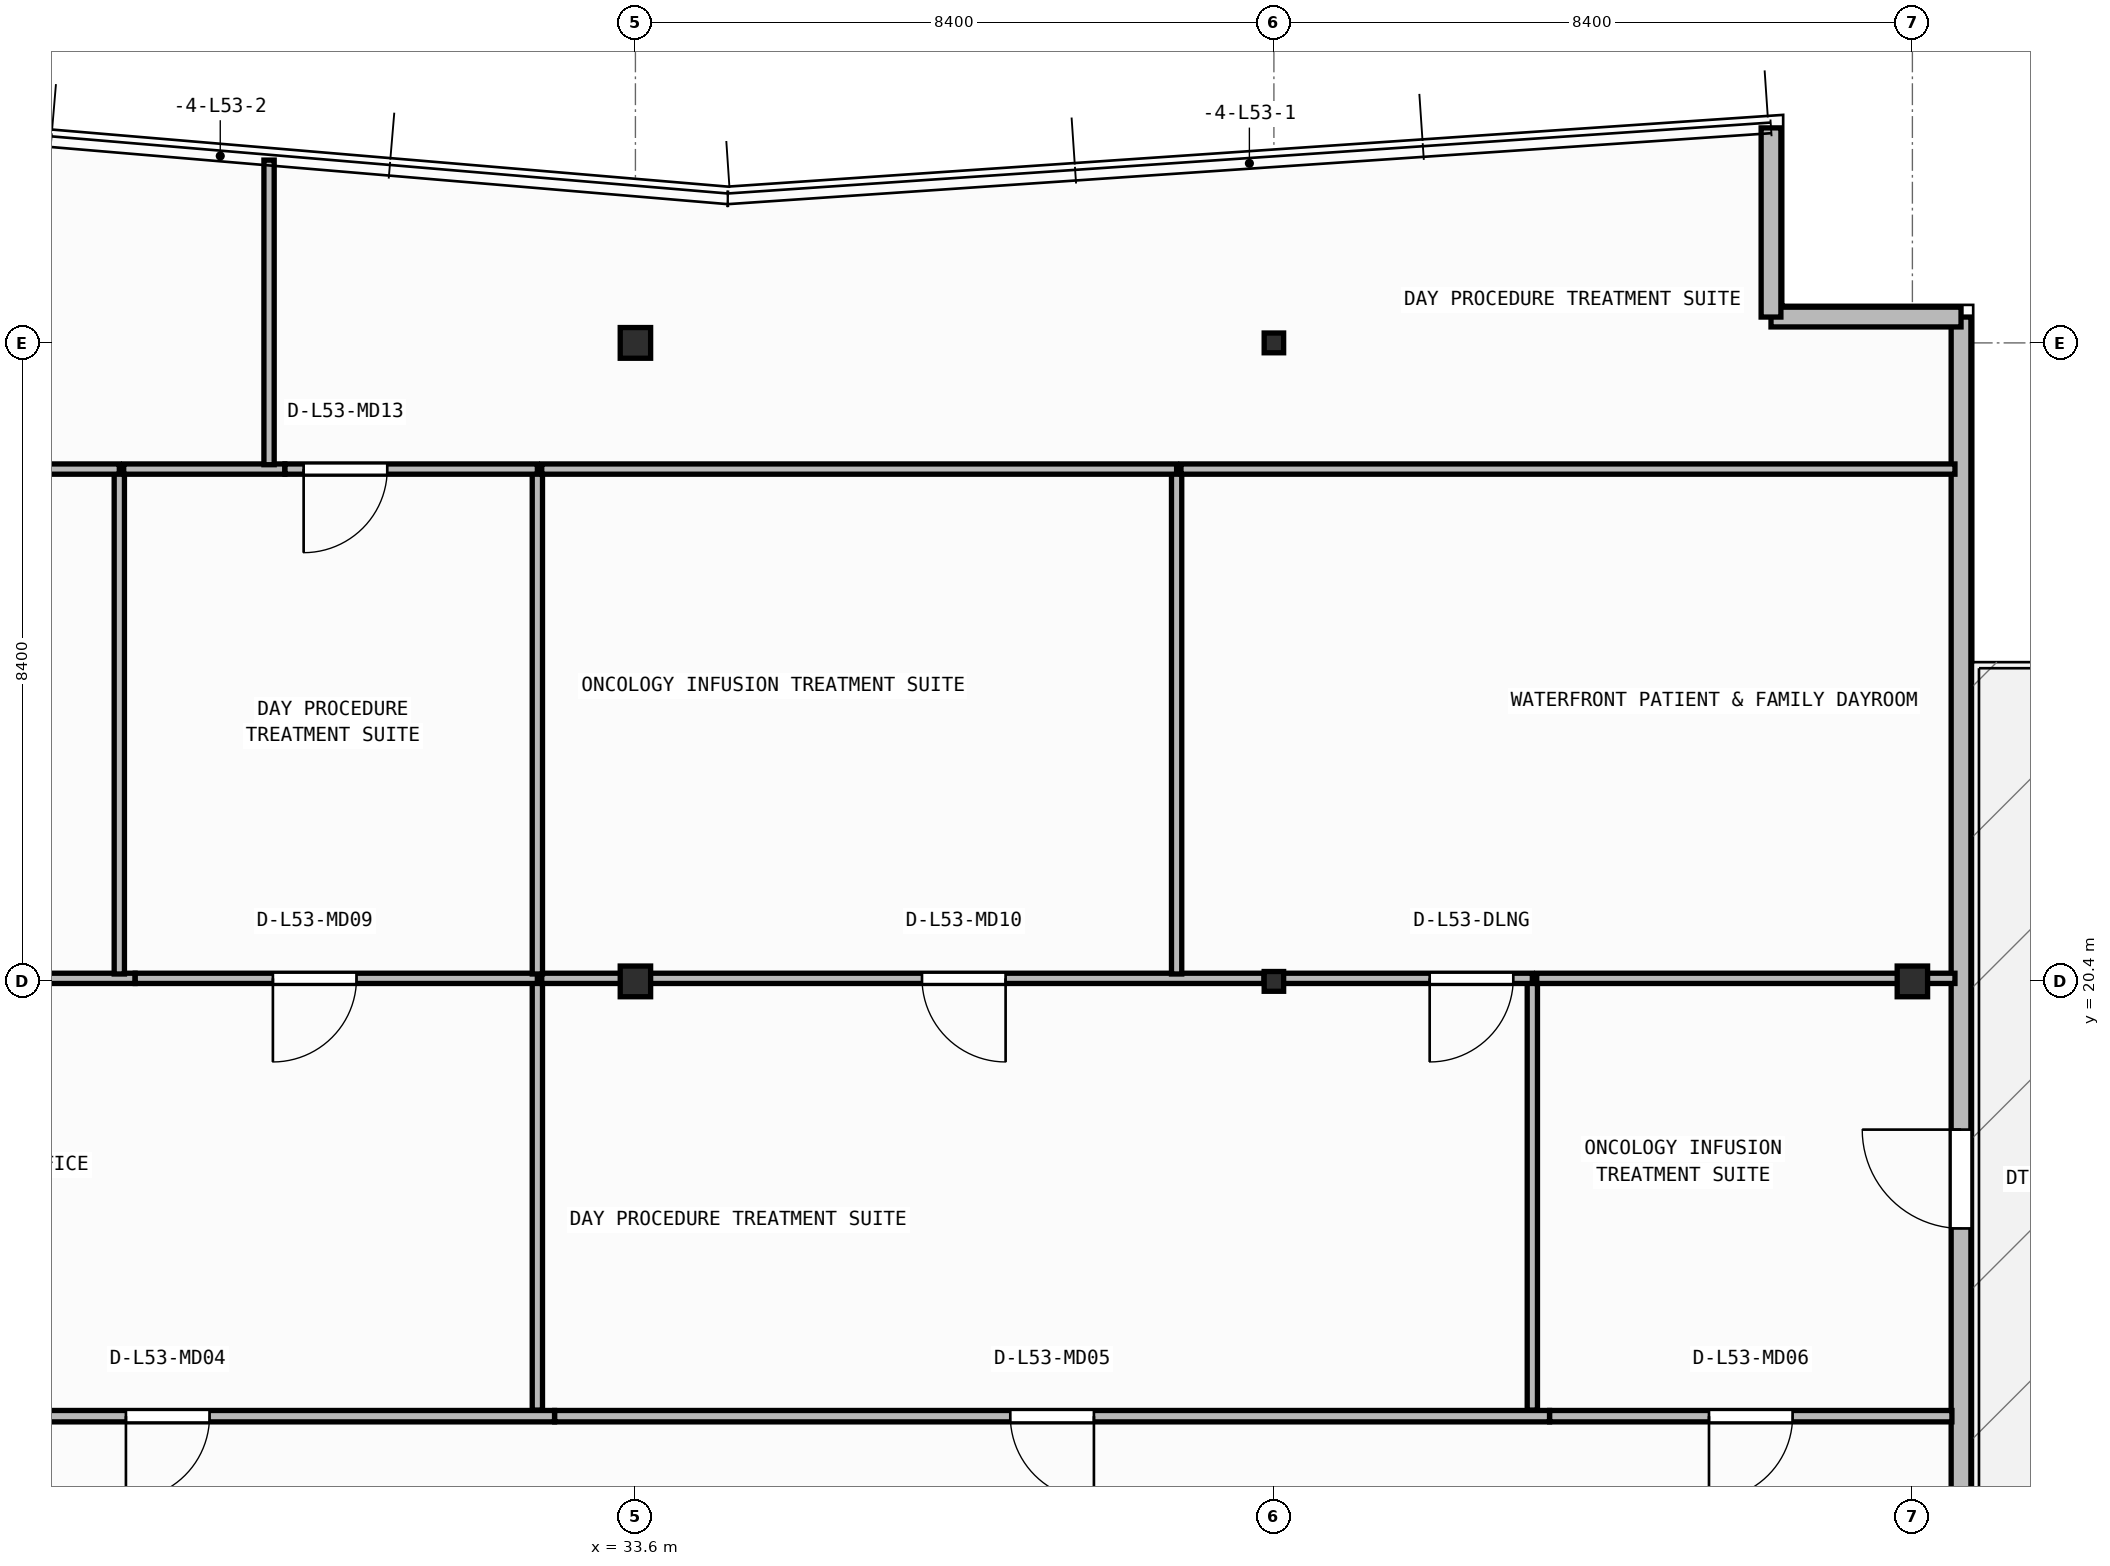
"""IFC4 building model, lengths in metres.
Left out: names, types, materials, properties, quantities, classifications, styles, units other than length and angle.
Written with IfcOpenShell. Run it as: python <this file> out.ifc"""

import sys

from ifc_helpers import new_model, si_unit, direction, frame, frame_2d, origin, origin_2d, place, context, subcontext, project, spatial, rectangle, i_section, extrude, element, fill, save


model = new_model("IFC4")
c1 = context("Model", 3, precision=1e-05, world=origin(), true_north=direction((0.0, 1.0)))
c2 = subcontext(c1, "Body", "Model", "MODEL_VIEW")
j1 = project(units=[si_unit("LENGTHUNIT", "METRE"), si_unit("PLANEANGLEUNIT", "RADIAN")], contexts=[c1])
p1 = place(None, origin())
s1 = spatial("IfcSite", under=j1, at=p1, CompositionType="ELEMENT")
p2 = place(p1, origin())
s2 = spatial("IfcBuilding", under=s1, at=p2, CompositionType="ELEMENT")
p3 = place(p2, frame((0.0, 0.0, 215.8)))
s3 = spatial("IfcBuildingStorey", under=s2, at=p3, CompositionType="ELEMENT", Elevation=215.8)
p4 = place(p3, frame((33.6, 20.4, 0.0), z_axis=(0.0, 0.0, 1.0), x_axis=(1.0, 0.0, 0.0)))
e1 = element("IfcColumn", 1, at=p4, inside=s3, PredefinedType="COLUMN", context=c2, shape_type="SweptSolid", body=[
    extrude(i_section(OverallWidth=0.4, OverallDepth=0.404, WebThickness=0.02, FlangeThickness=0.032, at=origin_2d()), origin(), (0.0, 0.0, 1.0), 3.95),
])
p5 = place(p3, frame((42.0, 20.4, 0.0), z_axis=(0.0, 0.0, 1.0), x_axis=(1.0, 0.0, 0.0)))
e2 = element("IfcColumn", 2, at=p5, inside=s3, PredefinedType="COLUMN", context=c2, shape_type="SweptSolid", body=[
    extrude(i_section(OverallWidth=0.256, OverallDepth=0.26, WebThickness=0.01, FlangeThickness=0.017, FilletRadius=0.013, at=origin_2d()), origin(), (0.0, 0.0, 1.0), 3.95),
])
for number, where, z_axis, x_axis in (
    (3, (50.4, 20.4, 0.0), (0.0, 0.0, 1.0), (1.0, 0.0, 0.0)),
    (4, (33.6, 28.8, 0.0), (0.0, 0.0, 1.0), (1.0, 0.0, 0.0)),
):
    element("IfcColumn", number, at=place(p3, frame(where, z_axis=z_axis, x_axis=x_axis)), inside=s3, PredefinedType="COLUMN", context=c2, shape_type="SweptSolid", body=[
        extrude(i_section(OverallWidth=0.4, OverallDepth=0.404, WebThickness=0.02, FlangeThickness=0.032, at=origin_2d()), origin(), (0.0, 0.0, 1.0), 3.95),
    ])
p6 = place(p3, frame((42.0, 28.8, 0.0), z_axis=(0.0, 0.0, 1.0), x_axis=(1.0, 0.0, 0.0)))
e5 = element("IfcColumn", 5, at=p6, inside=s3, PredefinedType="COLUMN", context=c2, shape_type="SweptSolid", body=[
    extrude(i_section(OverallWidth=0.256, OverallDepth=0.26, WebThickness=0.01, FlangeThickness=0.017, FilletRadius=0.013, at=origin_2d()), origin(), (0.0, 0.0, 1.0), 3.95),
])
p7 = place(p3, frame((51.04, 6.46, 0.0), z_axis=(0.0, 0.0, 1.0), x_axis=(0.0, 1.0, 0.0)))
e6 = element("IfcWall", 6, at=p7, inside=s3, PredefinedType="STANDARD", context=c2, shape_type="SweptSolid", body=[
    extrude(rectangle(XDim=22.68, YDim=0.26, at=frame_2d((11.34, 0.0))), origin(), (0.0, 0.0, 1.0), 3.71),
])
p8 = place(p7, frame((10.69, 0.0, 0.0)))
e7 = element("IfcOpeningElement", 7, at=p8, cuts=e6, PredefinedType="OPENING", context=c2, shape_type="SweptSolid", body=[
    extrude(rectangle(XDim=1.3, YDim=2.15, at=frame_2d((0.65, 1.075))), frame((0.0, 0.14, 0.0), z_axis=(0.0, -1.0, 0.0), x_axis=(1.0, 0.0, 0.0)), (0.0, 0.0, 1.0), 0.28),
])
p9 = place(p3, frame((51.04, 29.14, 0.0), z_axis=(0.0, 0.0, 1.0), x_axis=(-1.0, 0.0, 0.0)))
e8 = element("IfcWall", 8, at=p9, inside=s3, PredefinedType="STANDARD", context=c2, shape_type="SweptSolid", body=[
    extrude(rectangle(XDim=2.5, YDim=0.26, at=frame_2d((1.25, 0.0))), origin(), (0.0, 0.0, 1.0), 3.71),
])
p10 = place(p3, frame((48.54, 29.14, 0.0), z_axis=(0.0, 0.0, 1.0), x_axis=(0.0, 1.0, 0.0)))
e9 = element("IfcWall", 9, at=p10, inside=s3, PredefinedType="STANDARD", context=c2, shape_type="SweptSolid", body=[
    extrude(rectangle(XDim=2.489, YDim=0.26, at=frame_2d((1.245, 0.0))), origin(), (0.0, 0.0, 1.0), 3.71),
])
p11 = place(p3, frame((32.536, 14.68, 0.0), z_axis=(0.0, 0.0, 1.0), x_axis=(-1.0, 0.0, 0.0)))
e10 = element("IfcWall", 10, at=p11, inside=s3, PredefinedType="PARTITIONING", context=c2, shape_type="SweptSolid", body=[
    extrude(rectangle(XDim=10.178, YDim=0.15, at=frame_2d((5.089, 0.0))), origin(), (0.0, 0.0, 1.0), 3.71),
])
p12 = place(p11, frame((4.539, 0.0, 0.0)))
e11 = element("IfcOpeningElement", 11, at=p12, cuts=e10, PredefinedType="OPENING", context=c2, shape_type="SweptSolid", body=[
    extrude(rectangle(XDim=1.1, YDim=2.1, at=frame_2d((0.55, 1.05))), frame((0.0, 0.085, 0.0), z_axis=(0.0, -1.0, 0.0), x_axis=(1.0, 0.0, 0.0)), (0.0, 0.0, 1.0), 0.17),
])
p13 = place(p3, frame((45.626, 14.68, 0.0), z_axis=(0.0, 0.0, 1.0), x_axis=(-1.0, 0.0, 0.0)))
e12 = element("IfcWall", 12, at=p13, inside=s3, PredefinedType="PARTITIONING", context=c2, shape_type="SweptSolid", body=[
    extrude(rectangle(XDim=13.088, YDim=0.15, at=frame_2d((6.544, 0.0))), origin(), (0.0, 0.0, 1.0), 3.71),
])
p14 = place(p13, frame((5.994, 0.0, 0.0)))
e13 = element("IfcOpeningElement", 13, at=p14, cuts=e12, PredefinedType="OPENING", context=c2, shape_type="SweptSolid", body=[
    extrude(rectangle(XDim=1.1, YDim=2.1, at=frame_2d((0.55, 1.05))), frame((0.0, 0.085, 0.0), z_axis=(0.0, -1.0, 0.0), x_axis=(1.0, 0.0, 0.0)), (0.0, 0.0, 1.0), 0.17),
])
p15 = place(p3, frame((50.92, 14.68, 0.0), z_axis=(0.0, 0.0, 1.0), x_axis=(-1.0, 0.0, 0.0)))
e14 = element("IfcWall", 14, at=p15, inside=s3, PredefinedType="PARTITIONING", context=c2, shape_type="SweptSolid", body=[
    extrude(rectangle(XDim=5.292, YDim=0.15, at=frame_2d((2.646, 0.0))), origin(), (0.0, 0.0, 1.0), 3.71),
])
p16 = place(p15, frame((2.096, 0.0, 0.0)))
e15 = element("IfcOpeningElement", 15, at=p16, cuts=e14, PredefinedType="OPENING", context=c2, shape_type="SweptSolid", body=[
    extrude(rectangle(XDim=1.1, YDim=2.1, at=frame_2d((0.55, 1.05))), frame((0.0, 0.085, 0.0), z_axis=(0.0, -1.0, 0.0), x_axis=(1.0, 0.0, 0.0)), (0.0, 0.0, 1.0), 0.17),
])
p17 = place(p3, frame((32.31, 14.76, 0.0), z_axis=(0.0, 0.0, 1.0), x_axis=(0.0, 1.0, 0.0)))
e16 = element("IfcWall", 16, at=p17, inside=s3, PredefinedType="PARTITIONING", context=c2, shape_type="SweptSolid", body=[
    extrude(rectangle(XDim=5.68, YDim=0.135, at=frame_2d((2.84, 0.0))), origin(), (0.0, 0.0, 1.0), 3.71),
])
p18 = place(p3, frame((27.018, 20.44, 0.0), z_axis=(0.0, 0.0, 1.0), x_axis=(-1.0, 0.0, 0.0)))
e17 = element("IfcWall", 17, at=p18, inside=s3, PredefinedType="PARTITIONING", context=c2, shape_type="SweptSolid", body=[
    extrude(rectangle(XDim=4.83, YDim=0.135, at=frame_2d((2.415, 0.0))), origin(), (0.0, 0.0, 1.0), 3.152),
])
p19 = place(p3, frame((32.31, 20.44, 0.0), z_axis=(0.0, 0.0, 1.0), x_axis=(-1.0, 0.0, 0.0)))
e18 = element("IfcWall", 18, at=p19, inside=s3, PredefinedType="PARTITIONING", context=c2, shape_type="SweptSolid", body=[
    extrude(rectangle(XDim=5.291, YDim=0.135, at=frame_2d((2.645, 0.0))), origin(), (0.0, 0.0, 1.0), 3.152),
])
p20 = place(p19, frame((2.379, 0.0, 0.0)))
e19 = element("IfcOpeningElement", 19, at=p20, cuts=e18, PredefinedType="OPENING", context=c2, shape_type="SweptSolid", body=[
    extrude(rectangle(XDim=1.1, YDim=2.1, at=frame_2d((0.55, 1.05))), frame((0.0, 0.077, 0.0), z_axis=(0.0, -1.0, 0.0), x_axis=(1.0, 0.0, 0.0)), (0.0, 0.0, 1.0), 0.155),
])
p21 = place(p3, frame((45.4, 14.76, 0.0), z_axis=(0.0, 0.0, 1.0), x_axis=(0.0, 1.0, 0.0)))
e20 = element("IfcWall", 20, at=p21, inside=s3, PredefinedType="PARTITIONING", context=c2, shape_type="SweptSolid", body=[
    extrude(rectangle(XDim=5.68, YDim=0.135, at=frame_2d((2.84, 0.0))), origin(), (0.0, 0.0, 1.0), 3.71),
])
p22 = place(p3, frame((41.872, 20.44, 0.0), z_axis=(0.0, 0.0, 1.0), x_axis=(-1.0, 0.0, 0.0)))
e21 = element("IfcWall", 21, at=p22, inside=s3, PredefinedType="PARTITIONING", context=c2, shape_type="SweptSolid", body=[
    extrude(rectangle(XDim=9.505, YDim=0.135, at=frame_2d((4.752, 0.0))), origin(), (0.0, 0.0, 1.0), 3.152),
])
p23 = place(p22, frame((3.402, 0.0, 0.0)))
e22 = element("IfcOpeningElement", 22, at=p23, cuts=e21, PredefinedType="OPENING", context=c2, shape_type="SweptSolid", body=[
    extrude(rectangle(XDim=1.1, YDim=2.1, at=frame_2d((0.55, 1.05))), frame((0.0, 0.077, 0.0), z_axis=(0.0, -1.0, 0.0), x_axis=(1.0, 0.0, 0.0)), (0.0, 0.0, 1.0), 0.155),
])
p24 = place(p3, frame((45.4, 20.44, 0.0), z_axis=(0.0, 0.0, 1.0), x_axis=(-1.0, 0.0, 0.0)))
e23 = element("IfcWall", 23, at=p24, inside=s3, PredefinedType="PARTITIONING", context=c2, shape_type="SweptSolid", body=[
    extrude(rectangle(XDim=3.526, YDim=0.135, at=frame_2d((1.763, 0.0))), origin(), (0.0, 0.0, 1.0), 3.152),
])
p25 = place(p24, frame((0.25, 0.0, 0.0)))
e24 = element("IfcOpeningElement", 24, at=p25, cuts=e23, PredefinedType="OPENING", context=c2, shape_type="SweptSolid", body=[
    extrude(rectangle(XDim=1.1, YDim=2.1, at=frame_2d((0.55, 1.05))), frame((0.0, 0.077, 0.0), z_axis=(0.0, -1.0, 0.0), x_axis=(1.0, 0.0, 0.0)), (0.0, 0.0, 1.0), 0.155),
])
p26 = place(p3, frame((50.96, 20.44, 0.0), z_axis=(0.0, 0.0, 1.0), x_axis=(-1.0, 0.0, 0.0)))
e25 = element("IfcWall", 25, at=p26, inside=s3, PredefinedType="PARTITIONING", context=c2, shape_type="SweptSolid", body=[
    extrude(rectangle(XDim=5.502, YDim=0.135, at=frame_2d((2.751, 0.0))), origin(), (0.0, 0.0, 1.0), 3.152),
])
p27 = place(p3, frame((26.81, 20.498, 0.0), z_axis=(0.0, 0.0, 1.0), x_axis=(0.0, 1.0, 0.0)))
e26 = element("IfcWall", 26, at=p27, inside=s3, PredefinedType="PARTITIONING", context=c2, shape_type="SweptSolid", body=[
    extrude(rectangle(XDim=6.642, YDim=0.135, at=frame_2d((3.321, 0.0))), origin(), (0.0, 0.0, 1.0), 3.71),
])
p28 = place(p3, frame((26.81, 27.14, 0.0), z_axis=(0.0, 0.0, 1.0), x_axis=(-1.0, 0.0, 0.0)))
e27 = element("IfcWall", 27, at=p28, inside=s3, PredefinedType="PARTITIONING", context=c2, shape_type="SweptSolid", body=[
    extrude(rectangle(XDim=13.03, YDim=0.135, at=frame_2d((6.515, 0.0))), origin(), (0.0, 0.0, 1.0), 3.71),
])
p29 = place(p28, frame((5.1, 0.0, 0.0)))
e28 = element("IfcOpeningElement", 28, at=p29, cuts=e27, PredefinedType="OPENING", context=c2, shape_type="SweptSolid", body=[
    extrude(rectangle(XDim=1.1, YDim=2.1, at=frame_2d((0.55, 1.05))), frame((0.0, 0.077, 0.0), z_axis=(0.0, -1.0, 0.0), x_axis=(1.0, 0.0, 0.0)), (0.0, 0.0, 1.0), 0.155),
])
p30 = place(p3, frame((32.31, 20.498, 0.0), z_axis=(0.0, 0.0, 1.0), x_axis=(0.0, 1.0, 0.0)))
e29 = element("IfcWall", 29, at=p30, inside=s3, PredefinedType="PARTITIONING", context=c2, shape_type="SweptSolid", body=[
    extrude(rectangle(XDim=6.642, YDim=0.135, at=frame_2d((3.321, 0.0))), origin(), (0.0, 0.0, 1.0), 3.71),
])
p31 = place(p3, frame((28.988, 27.14, 0.0), z_axis=(0.0, 0.0, 1.0), x_axis=(-1.0, 0.0, 0.0)))
e30 = element("IfcWall", 30, at=p31, inside=s3, PredefinedType="PARTITIONING", context=c2, shape_type="SweptSolid", body=[
    extrude(rectangle(XDim=2.12, YDim=0.135, at=frame_2d((1.06, 0.0))), origin(), (0.0, 0.0, 1.0), 3.71),
])
p32 = place(p3, frame((32.31, 27.14, 0.0), z_axis=(0.0, 0.0, 1.0), x_axis=(-1.0, 0.0, 0.0)))
e31 = element("IfcWall", 31, at=p32, inside=s3, PredefinedType="PARTITIONING", context=c2, shape_type="SweptSolid", body=[
    extrude(rectangle(XDim=3.321, YDim=0.135, at=frame_2d((1.66, 0.0))), origin(), (0.0, 0.0, 1.0), 3.71),
])
p33 = place(p32, frame((1.975, 0.0, 0.0)))
e32 = element("IfcOpeningElement", 32, at=p33, cuts=e31, PredefinedType="OPENING", context=c2, shape_type="SweptSolid", body=[
    extrude(rectangle(XDim=1.1, YDim=2.1, at=frame_2d((0.55, 1.05))), frame((0.0, 0.077, 0.0), z_axis=(0.0, -1.0, 0.0), x_axis=(1.0, 0.0, 0.0)), (0.0, 0.0, 1.0), 0.155),
])
p34 = place(p3, frame((40.72, 20.498, 0.0), z_axis=(0.0, 0.0, 1.0), x_axis=(0.0, 1.0, 0.0)))
e33 = element("IfcWall", 33, at=p34, inside=s3, PredefinedType="PARTITIONING", context=c2, shape_type="SweptSolid", body=[
    extrude(rectangle(XDim=6.642, YDim=0.135, at=frame_2d((3.321, 0.0))), origin(), (0.0, 0.0, 1.0), 3.71),
])
p35 = place(p3, frame((40.72, 27.14, 0.0), z_axis=(0.0, 0.0, 1.0), x_axis=(-1.0, 0.0, 0.0)))
e34 = element("IfcWall", 34, at=p35, inside=s3, PredefinedType="PARTITIONING", context=c2, shape_type="SweptSolid", body=[
    extrude(rectangle(XDim=8.353, YDim=0.135, at=frame_2d((4.176, 0.0))), origin(), (0.0, 0.0, 1.0), 3.71),
])
p36 = place(p3, frame((50.96, 27.14, 0.0), z_axis=(0.0, 0.0, 1.0), x_axis=(-1.0, 0.0, 0.0)))
e35 = element("IfcWall", 35, at=p36, inside=s3, PredefinedType="PARTITIONING", context=c2, shape_type="SweptSolid", body=[
    extrude(rectangle(XDim=10.182, YDim=0.135, at=frame_2d((5.091, 0.0))), origin(), (0.0, 0.0, 1.0), 3.71),
])
p37 = place(p3, frame((28.78, 27.198, 0.0), z_axis=(0.0, 0.0, 1.0), x_axis=(0.0, 1.0, 0.0)))
e36 = element("IfcWall", 36, at=p37, inside=s3, PredefinedType="PARTITIONING", context=c2, shape_type="SweptSolid", body=[
    extrude(rectangle(XDim=4.008, YDim=0.135, at=frame_2d((2.004, 0.0))), origin(), (0.0, 0.0, 1.0), 3.71),
])
p38 = place(p8, origin())
e37 = element("IfcDoor", 37, at=p38, inside=s3, OperationType="SINGLE_SWING_RIGHT", PredefinedType="DOOR", context=c2, shape_type="SweptSolid", body=[
    extrude(rectangle(XDim=1.3, YDim=2.15, at=frame_2d((0.65, 1.075))), frame((0.0, 0.025, 0.0), z_axis=(0.0, -1.0, 0.0), x_axis=(1.0, 0.0, 0.0)), (0.0, 0.0, 1.0), 0.05),
])
fill(e7, e37)
p39 = place(p12, origin())
e38 = element("IfcDoor", 38, at=p39, inside=s3, OperationType="SINGLE_SWING_RIGHT", PredefinedType="DOOR", context=c2, shape_type="SweptSolid", body=[
    extrude(rectangle(XDim=1.1, YDim=2.1, at=frame_2d((0.55, 1.05))), frame((0.0, 0.025, 0.0), z_axis=(0.0, -1.0, 0.0), x_axis=(1.0, 0.0, 0.0)), (0.0, 0.0, 1.0), 0.05),
])
fill(e11, e38)
p40 = place(p14, origin())
e39 = element("IfcDoor", 39, at=p40, inside=s3, OperationType="SINGLE_SWING_LEFT", PredefinedType="DOOR", context=c2, shape_type="SweptSolid", body=[
    extrude(rectangle(XDim=1.1, YDim=2.1, at=frame_2d((0.55, 1.05))), frame((0.0, 0.025, 0.0), z_axis=(0.0, -1.0, 0.0), x_axis=(1.0, 0.0, 0.0)), (0.0, 0.0, 1.0), 0.05),
])
fill(e13, e39)
p41 = place(p16, origin())
e40 = element("IfcDoor", 40, at=p41, inside=s3, OperationType="SINGLE_SWING_RIGHT", PredefinedType="DOOR", context=c2, shape_type="SweptSolid", body=[
    extrude(rectangle(XDim=1.1, YDim=2.1, at=frame_2d((0.55, 1.05))), frame((0.0, 0.025, 0.0), z_axis=(0.0, -1.0, 0.0), x_axis=(1.0, 0.0, 0.0)), (0.0, 0.0, 1.0), 0.05),
])
fill(e15, e40)
p42 = place(p20, origin())
e41 = element("IfcDoor", 41, at=p42, inside=s3, OperationType="SINGLE_SWING_RIGHT", PredefinedType="DOOR", context=c2, shape_type="SweptSolid", body=[
    extrude(rectangle(XDim=1.1, YDim=2.1, at=frame_2d((0.55, 1.05))), frame((0.0, 0.025, 0.0), z_axis=(0.0, -1.0, 0.0), x_axis=(1.0, 0.0, 0.0)), (0.0, 0.0, 1.0), 0.05),
])
fill(e19, e41)
p43 = place(p23, origin())
e42 = element("IfcDoor", 42, at=p43, inside=s3, OperationType="SINGLE_SWING_LEFT", PredefinedType="DOOR", context=c2, shape_type="SweptSolid", body=[
    extrude(rectangle(XDim=1.1, YDim=2.1, at=frame_2d((0.55, 1.05))), frame((0.0, 0.025, 0.0), z_axis=(0.0, -1.0, 0.0), x_axis=(1.0, 0.0, 0.0)), (0.0, 0.0, 1.0), 0.05),
])
fill(e22, e42)
p44 = place(p25, origin())
e43 = element("IfcDoor", 43, at=p44, inside=s3, OperationType="SINGLE_SWING_RIGHT", PredefinedType="DOOR", context=c2, shape_type="SweptSolid", body=[
    extrude(rectangle(XDim=1.1, YDim=2.1, at=frame_2d((0.55, 1.05))), frame((0.0, 0.025, 0.0), z_axis=(0.0, -1.0, 0.0), x_axis=(1.0, 0.0, 0.0)), (0.0, 0.0, 1.0), 0.05),
])
fill(e24, e43)
p45 = place(p33, origin())
e44 = element("IfcDoor", 44, at=p45, inside=s3, OperationType="SINGLE_SWING_RIGHT", PredefinedType="DOOR", context=c2, shape_type="SweptSolid", body=[
    extrude(rectangle(XDim=1.1, YDim=2.1, at=frame_2d((0.55, 1.05))), frame((0.0, 0.025, 0.0), z_axis=(0.0, -1.0, 0.0), x_axis=(1.0, 0.0, 0.0)), (0.0, 0.0, 1.0), 0.05),
])
fill(e32, e44)
save(model, sys.argv[1])
